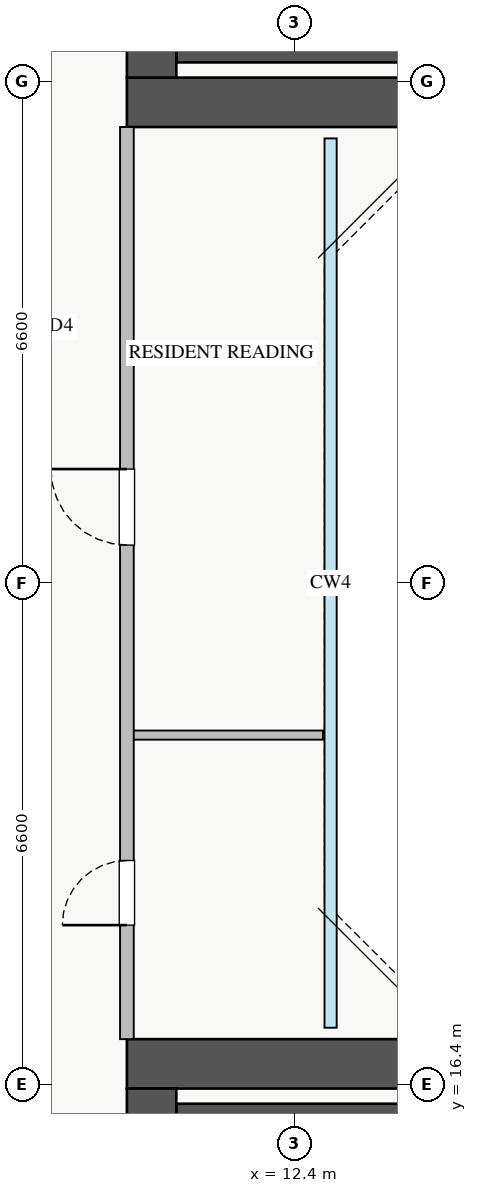
"""IFC4 building model, lengths in metres.
Left out: names, types, materials, properties, quantities, classifications, styles, units other than length and angle.
Written with IfcOpenShell. Run it as: python <this file> out.ifc"""

import sys

from ifc_helpers import new_model, si_unit, direction, frame, frame_2d, origin, place, context, subcontext, project, spatial, rectangle, extrude, source, transform, mapped, element, fill, save


model = new_model("IFC4")
c1 = context("Model", 3, precision=1e-05, world=origin(), true_north=direction((0.0, 1.0)))
c2 = subcontext(c1, "Body", "Model", "MODEL_VIEW")
j1 = project(units=[si_unit("LENGTHUNIT", "METRE"), si_unit("PLANEANGLEUNIT", "RADIAN")], contexts=[c1])
p1 = place(None, origin())
s1 = spatial("IfcSite", under=j1, at=p1, CompositionType="ELEMENT")
p2 = place(p1, origin())
s2 = spatial("IfcBuilding", under=s1, at=p2, CompositionType="ELEMENT")
p3 = place(p2, frame((0.0, 0.0, 116.5)))
s3 = spatial("IfcBuildingStorey", under=s2, at=p3, CompositionType="ELEMENT", Elevation=116.5)
for number, where, z_axis, x_axis in (
    (1, (10.85, 29.95, 0.0), (0.0, 0.0, 1.0), (1.0, 0.0, 0.0)),
    (2, (10.85, 16.05, 0.0), (0.0, 0.0, 1.0), (1.0, 0.0, 0.0)),
):
    element("IfcWall", number, at=place(p3, frame(where, z_axis=z_axis, x_axis=x_axis)), inside=s3, PredefinedType="SHEAR", context=c2, shape_type="SweptSolid", body=[
        extrude(rectangle(XDim=7.3, YDim=0.2, at=frame_2d((3.65, 0.0))), origin(), (0.0, 0.0, 1.0), 3.25),
    ])
p4 = place(p3, frame((10.2, 29.325, 0.0), z_axis=(0.0, 0.0, 1.0), x_axis=(1.0, 0.0, 0.0)))
e3 = element("IfcWall", 3, at=p4, inside=s3, PredefinedType="SHEAR", context=c2, shape_type="SweptSolid", body=[
    extrude(rectangle(XDim=17.6, YDim=0.65, at=frame_2d((8.8, 0.0))), origin(), (0.0, 0.0, 1.0), 3.25),
])
p5 = place(p3, frame((10.525, 29.65, 0.0), z_axis=(0.0, 0.0, 1.0), x_axis=(0.0, 1.0, 0.0)))
e4 = element("IfcWall", 4, at=p5, inside=s3, PredefinedType="SHEAR", context=c2, shape_type="SweptSolid", body=[
    extrude(rectangle(XDim=5.9, YDim=0.65, at=frame_2d((2.95, 0.0))), origin(), (0.0, 0.0, 1.0), 3.25),
])
p6 = place(p3, frame((10.2, 16.675, 0.0), z_axis=(0.0, 0.0, 1.0), x_axis=(1.0, 0.0, 0.0)))
e5 = element("IfcWall", 5, at=p6, inside=s3, PredefinedType="SHEAR", context=c2, shape_type="SweptSolid", body=[
    extrude(rectangle(XDim=17.6, YDim=0.65, at=frame_2d((8.8, 0.0))), origin(), (0.0, 0.0, 1.0), 3.25),
])
p7 = place(p3, frame((10.525, 10.45, 0.0), z_axis=(0.0, 0.0, 1.0), x_axis=(0.0, 1.0, 0.0)))
e6 = element("IfcWall", 6, at=p7, inside=s3, PredefinedType="SHEAR", context=c2, shape_type="SweptSolid", body=[
    extrude(rectangle(XDim=5.9, YDim=0.65, at=frame_2d((2.95, 0.0))), origin(), (0.0, 0.0, 1.0), 3.25),
])
p8 = place(p3, frame((10.2, 21.0, 0.0), z_axis=(0.0, 0.0, 1.0), x_axis=(1.0, 0.0, 0.0)))
e7 = element("IfcWall", 7, at=p8, inside=s3, PredefinedType="PLUMBINGWALL", context=c2, shape_type="SweptSolid", body=[
    extrude(rectangle(XDim=2.58, YDim=0.12, at=frame_2d((1.29, 0.0))), origin(), (0.0, 0.0, 1.0), 3.07),
])
p9 = place(p3, frame((10.2, 17.0, 0.0), z_axis=(0.0, 0.0, 1.0), x_axis=(0.0, 1.0, 0.0)))
e8 = element("IfcWall", 8, at=p9, inside=s3, PredefinedType="PARTITIONING", context=c2, shape_type="SweptSolid", body=[
    extrude(rectangle(XDim=12.0, YDim=0.18, at=frame_2d((6.0, 0.0))), origin(), (0.0, 0.0, 1.0), 3.07),
])
p10 = place(p9, frame((1.5, 0.0, 0.0)))
e9 = element("IfcOpeningElement", 9, at=p10, cuts=e8, PredefinedType="OPENING", context=c2, shape_type="SweptSolid", body=[
    extrude(rectangle(XDim=0.85, YDim=2.05, at=frame_2d((0.425, 1.025))), frame((0.0, 0.1, 0.0), z_axis=(0.0, -1.0, 0.0), x_axis=(1.0, 0.0, 0.0)), (0.0, 0.0, 1.0), 0.2),
])
p11 = place(p9, frame((6.5, 0.0, 0.0)))
e10 = element("IfcOpeningElement", 10, at=p11, cuts=e8, PredefinedType="OPENING", context=c2, shape_type="SweptSolid", body=[
    extrude(rectangle(XDim=1.0, YDim=2.05, at=frame_2d((0.5, 1.025))), frame((0.0, 0.1, 0.0), z_axis=(0.0, -1.0, 0.0), x_axis=(1.0, 0.0, 0.0)), (0.0, 0.0, 1.0), 0.2),
])
m1 = source(origin(), c2, "Body", "SweptSolid", [
    extrude(rectangle(XDim=0.85, YDim=2.05, at=frame_2d((0.425, 1.025))), frame((0.0, 0.025, 0.0), z_axis=(0.0, -1.0, 0.0), x_axis=(1.0, 0.0, 0.0)), (0.0, 0.0, 1.0), 0.05),
])
p12 = place(p10, origin())
e11 = element("IfcDoor", 11, at=p12, inside=s3, OperationType="SINGLE_SWING_LEFT", PredefinedType="DOOR", context=c2, shape_type="MappedRepresentation", body=[
    mapped(m1, transform((0.0, 0.0, 0.0), x_axis=(1.0, 0.0, 0.0), y_axis=(0.0, 1.0, 0.0), z_axis=(0.0, 0.0, 1.0), scale=1.0)),
])
fill(e9, e11)
m2 = source(origin(), c2, "Body", "SweptSolid", [
    extrude(rectangle(XDim=1.0, YDim=2.05, at=frame_2d((0.5, 1.025))), frame((0.0, 0.025, 0.0), z_axis=(0.0, -1.0, 0.0), x_axis=(1.0, 0.0, 0.0)), (0.0, 0.0, 1.0), 0.05),
])
p13 = place(p11, origin())
e12 = element("IfcDoor", 12, at=p13, inside=s3, OperationType="SINGLE_SWING_RIGHT", PredefinedType="DOOR", context=c2, shape_type="MappedRepresentation", body=[
    mapped(m2, transform((0.0, 0.0, 0.0), x_axis=(1.0, 0.0, 0.0), y_axis=(0.0, 1.0, 0.0), z_axis=(0.0, 0.0, 1.0), scale=1.0)),
])
fill(e10, e12)
save(model, sys.argv[1])
